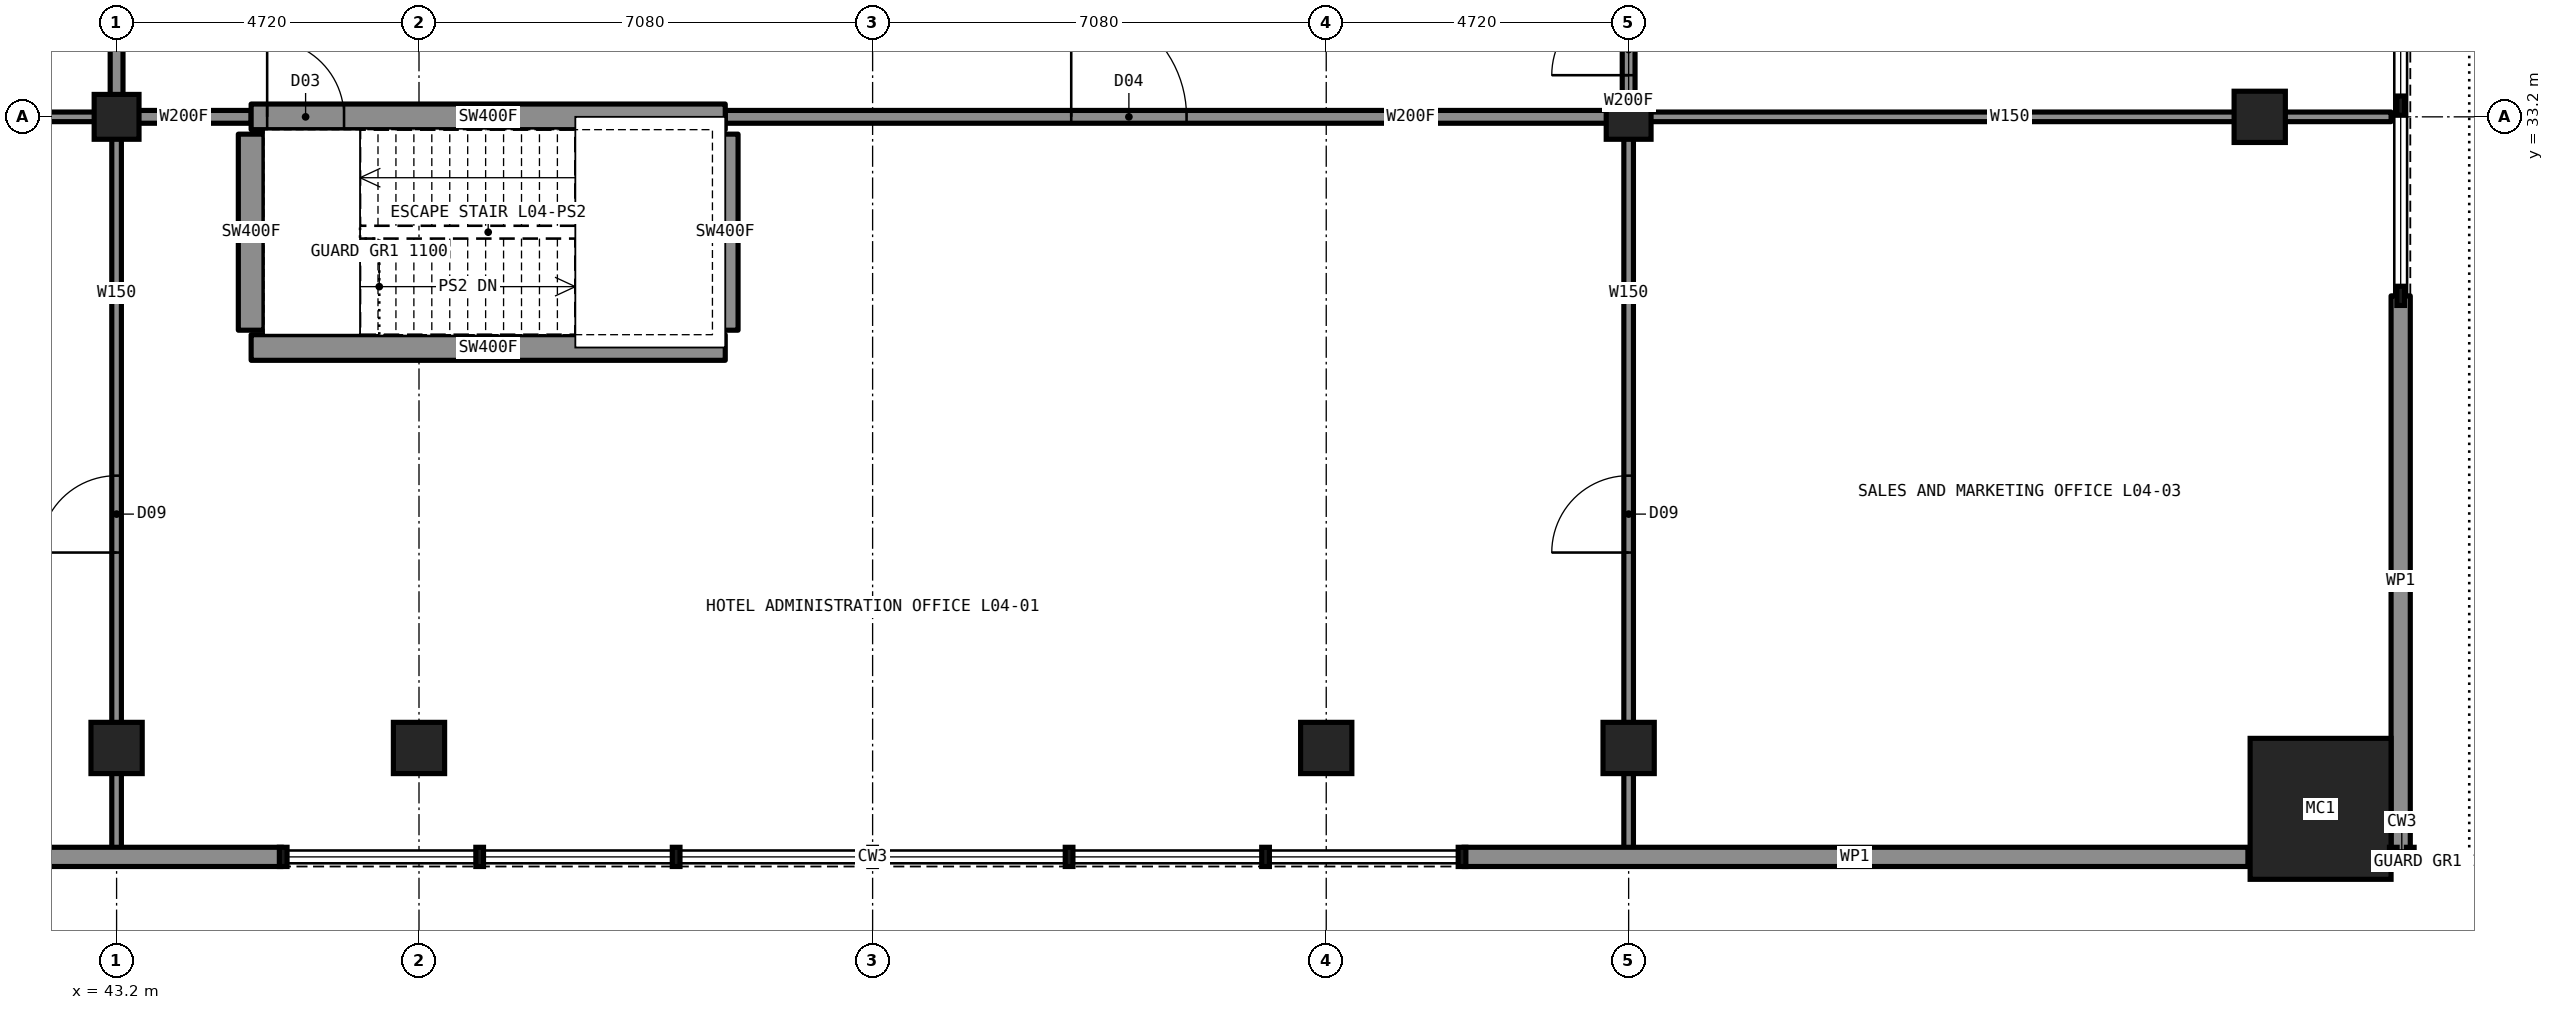
"""IFC4 building model, lengths in metres.
Left out: names, types, materials, properties, quantities, classifications, styles, units other than length and angle.
Written with IfcOpenShell. Run it as: python <this file> out.ifc"""

import sys

from ifc_helpers import new_model, si_unit, direction, frame, frame_2d, origin, origin_2d, place, context, subcontext, project, spatial, rectangle, hollow_rectangle, extrude, element, fill, save


model = new_model("IFC4")
c1 = context("Model", 3, precision=1e-05, world=origin(), true_north=direction((0.0, 1.0)))
c2 = subcontext(c1, "Body", "Model", "MODEL_VIEW")
j1 = project(units=[si_unit("LENGTHUNIT", "METRE"), si_unit("PLANEANGLEUNIT", "RADIAN")], contexts=[c1])
p1 = place(None, origin())
s1 = spatial("IfcSite", under=j1, at=p1, CompositionType="ELEMENT")
p2 = place(p1, origin())
s2 = spatial("IfcBuilding", under=s1, at=p2, CompositionType="ELEMENT")
p3 = place(p2, frame((0.0, 0.0, 20.5)))
s3 = spatial("IfcBuildingStorey", under=s2, at=p3, CompositionType="ELEMENT", Elevation=20.5)
for number, where, z_axis, x_axis in (
    (1, (43.2, 23.35, 0.0), (0.0, 0.0, 1.0), (1.0, 0.0, 0.0)),
    (2, (47.92, 23.35, 0.0), (0.0, 0.0, 1.0), (1.0, 0.0, 0.0)),
    (3, (62.08, 23.35, 0.0), (0.0, 0.0, 1.0), (1.0, 0.0, 0.0)),
    (4, (66.8, 23.35, 0.0), (0.0, 0.0, 1.0), (1.0, 0.0, 0.0)),
    (5, (76.65, 33.2, 0.0), (0.0, 0.0, 1.0), (1.0, 0.0, 0.0)),
):
    element("IfcColumn", number, at=place(p3, frame(where, z_axis=z_axis, x_axis=x_axis)), inside=s3, PredefinedType="COLUMN", context=c2, shape_type="SweptSolid", body=[
        extrude(hollow_rectangle(XDim=0.8, YDim=0.8, WallThickness=0.05, at=origin_2d()), origin(), (0.0, 0.0, 1.0), 4.5),
    ])
for number, where, z_axis, x_axis in (
    (6, (43.2, 33.2, 0.0), (0.0, 0.0, 1.0), (1.0, 0.0, 0.0)),
    (7, (66.8, 33.2, 0.0), (0.0, 0.0, 1.0), (1.0, 0.0, 0.0)),
):
    element("IfcColumn", number, at=place(p3, frame(where, z_axis=z_axis, x_axis=x_axis)), inside=s3, PredefinedType="COLUMN", context=c2, shape_type="SweptSolid", body=[
        extrude(hollow_rectangle(XDim=0.7, YDim=0.7, WallThickness=0.06, at=origin_2d()), origin(), (0.0, 0.0, 1.0), 4.5),
    ])
p4 = place(p3, frame((77.6, 22.4, 0.0), z_axis=(0.0, 0.0, 1.0), x_axis=(1.0, 0.0, 0.0)))
e8 = element("IfcColumn", 8, at=p4, inside=s3, PredefinedType="COLUMN", context=c2, shape_type="SweptSolid", body=[
    extrude(hollow_rectangle(XDim=2.2, YDim=2.2, WallThickness=0.15, at=origin_2d()), origin(), (0.0, 0.0, 1.0), 4.5),
])
p5 = place(p3, frame((43.2, 33.2, 0.0), z_axis=(0.0, 0.0, 1.0), x_axis=(1.0, 0.0, 0.0)))
e9 = element("IfcWall", 9, at=p5, inside=s3, PredefinedType="PARTITIONING", context=c2, shape_type="SweptSolid", body=[
    extrude(rectangle(XDim=2.1, YDim=0.2, at=frame_2d((1.05, 0.0))), origin(), (0.0, 0.0, 1.0), 4.33),
])
p6 = place(p3, frame((52.7, 33.2, 0.0), z_axis=(0.0, 0.0, 1.0), x_axis=(1.0, 0.0, 0.0)))
e10 = element("IfcWall", 10, at=p6, inside=s3, PredefinedType="PARTITIONING", context=c2, shape_type="SweptSolid", body=[
    extrude(rectangle(XDim=14.1, YDim=0.2, at=frame_2d((7.05, 0.0))), origin(), (0.0, 0.0, 1.0), 4.33),
])
p7 = place(p6, frame((5.4, 0.0, 0.0)))
e11 = element("IfcOpeningElement", 11, at=p7, cuts=e10, PredefinedType="OPENING", context=c2, shape_type="SweptSolid", body=[
    extrude(rectangle(XDim=1.8, YDim=2.2, at=frame_2d((0.9, 1.1))), frame((0.0, 0.11, 0.0), z_axis=(0.0, -1.0, 0.0), x_axis=(1.0, 0.0, 0.0)), (0.0, 0.0, 1.0), 0.22),
])
p8 = place(p3, frame((31.255, 33.2, 0.0), z_axis=(0.0, 0.0, 1.0), x_axis=(1.0, 0.0, 0.0)))
e12 = element("IfcWall", 12, at=p8, inside=s3, PredefinedType="PARTITIONING", context=c2, shape_type="SweptSolid", body=[
    extrude(rectangle(XDim=11.945, YDim=0.15, at=frame_2d((5.973, 0.0))), origin(), (0.0, 0.0, 1.0), 3.13),
])
p9 = place(p8, frame((0.295, 0.0, 0.0)))
e13 = element("IfcOpeningElement", 13, at=p9, cuts=e12, PredefinedType="OPENING", context=c2, shape_type="SweptSolid", body=[
    extrude(rectangle(XDim=1.2, YDim=2.2, at=frame_2d((0.6, 1.1))), frame((0.0, 0.085, 0.0), z_axis=(0.0, -1.0, 0.0), x_axis=(1.0, 0.0, 0.0)), (0.0, 0.0, 1.0), 0.17),
])
p10 = place(p3, frame((66.8, 33.2, 0.0), z_axis=(0.0, 0.0, 1.0), x_axis=(1.0, 0.0, 0.0)))
e14 = element("IfcWall", 14, at=p10, inside=s3, PredefinedType="PARTITIONING", context=c2, shape_type="SweptSolid", body=[
    extrude(rectangle(XDim=11.9, YDim=0.15, at=frame_2d((5.95, 0.0))), origin(), (0.0, 0.0, 1.0), 3.13),
])
p11 = place(p3, frame((45.3, 33.2, 0.0), z_axis=(0.0, 0.0, 1.0), x_axis=(1.0, 0.0, 0.0)))
e15 = element("IfcWall", 15, at=p11, inside=s3, PredefinedType="SHEAR", context=c2, shape_type="SweptSolid", body=[
    extrude(rectangle(XDim=7.4, YDim=0.4, at=frame_2d((3.7, 0.0))), origin(), (0.0, 0.0, 1.0), 4.5),
])
p12 = place(p11, frame((0.25, 0.0, 0.0)))
e16 = element("IfcOpeningElement", 16, at=p12, cuts=e15, PredefinedType="OPENING", context=c2, shape_type="SweptSolid", body=[
    extrude(rectangle(XDim=1.2, YDim=2.2, at=frame_2d((0.6, 1.1))), frame((0.0, 0.21, 0.0), z_axis=(0.0, -1.0, 0.0), x_axis=(1.0, 0.0, 0.0)), (0.0, 0.0, 1.0), 0.42),
])
p13 = place(p3, frame((45.3, 29.6, 0.0), z_axis=(0.0, 0.0, 1.0), x_axis=(1.0, 0.0, 0.0)))
e17 = element("IfcWall", 17, at=p13, inside=s3, PredefinedType="SHEAR", context=c2, shape_type="SweptSolid", body=[
    extrude(rectangle(XDim=7.4, YDim=0.4, at=frame_2d((3.7, 0.0))), origin(), (0.0, 0.0, 1.0), 4.5),
])
p14 = place(p3, frame((43.2, 33.2, 0.0), z_axis=(0.0, 0.0, 1.0), x_axis=(0.0, 1.0, 0.0)))
e18 = element("IfcWall", 18, at=p14, inside=s3, PredefinedType="PARTITIONING", context=c2, shape_type="SweptSolid", body=[
    extrude(rectangle(XDim=14.1, YDim=0.2, at=frame_2d((7.05, 0.0))), origin(), (0.0, 0.0, 1.0), 4.33),
])
p15 = place(p14, frame((12.4, 0.0, 0.0)))
e19 = element("IfcOpeningElement", 19, at=p15, cuts=e18, PredefinedType="OPENING", context=c2, shape_type="SweptSolid", body=[
    extrude(rectangle(XDim=1.0, YDim=2.1, at=frame_2d((0.5, 1.05))), frame((0.0, 0.11, 0.0), z_axis=(0.0, -1.0, 0.0), x_axis=(1.0, 0.0, 0.0)), (0.0, 0.0, 1.0), 0.22),
])
p16 = place(p14, frame((2.45, 0.0, 0.0)))
e20 = element("IfcOpeningElement", 20, at=p16, cuts=e18, PredefinedType="OPENING", context=c2, shape_type="SweptSolid", body=[
    extrude(rectangle(XDim=0.9, YDim=2.1, at=frame_2d((0.45, 1.05))), frame((0.0, 0.11, 0.0), z_axis=(0.0, -1.0, 0.0), x_axis=(1.0, 0.0, 0.0)), (0.0, 0.0, 1.0), 0.22),
])
p17 = place(p14, frame((8.25, 0.0, 0.0)))
e21 = element("IfcOpeningElement", 21, at=p17, cuts=e18, PredefinedType="OPENING", context=c2, shape_type="SweptSolid", body=[
    extrude(rectangle(XDim=0.9, YDim=2.1, at=frame_2d((0.45, 1.05))), frame((0.0, 0.11, 0.0), z_axis=(0.0, -1.0, 0.0), x_axis=(1.0, 0.0, 0.0)), (0.0, 0.0, 1.0), 0.22),
])
p18 = place(p3, frame((43.2, 21.755, 0.0), z_axis=(0.0, 0.0, 1.0), x_axis=(0.0, 1.0, 0.0)))
e22 = element("IfcWall", 22, at=p18, inside=s3, PredefinedType="PARTITIONING", context=c2, shape_type="SweptSolid", body=[
    extrude(rectangle(XDim=11.445, YDim=0.15, at=frame_2d((5.723, 0.0))), origin(), (0.0, 0.0, 1.0), 3.13),
])
p19 = place(p18, frame((4.645, 0.0, 0.0)))
e23 = element("IfcOpeningElement", 23, at=p19, cuts=e22, PredefinedType="OPENING", context=c2, shape_type="SweptSolid", body=[
    extrude(rectangle(XDim=1.2, YDim=2.2, at=frame_2d((0.6, 1.1))), frame((0.0, 0.085, 0.0), z_axis=(0.0, -1.0, 0.0), x_axis=(1.0, 0.0, 0.0)), (0.0, 0.0, 1.0), 0.17),
])
for number, where, z_axis, x_axis in (
    (24, (52.7, 29.87, 0.0), (0.0, 0.0, 1.0), (0.0, 1.0, 0.0)),
    (25, (45.3, 29.87, 0.0), (0.0, 0.0, 1.0), (0.0, 1.0, 0.0)),
):
    element("IfcWall", number, at=place(p3, frame(where, z_axis=z_axis, x_axis=x_axis)), inside=s3, PredefinedType="SHEAR", context=c2, shape_type="SweptSolid", body=[
        extrude(rectangle(XDim=3.06, YDim=0.4, at=frame_2d((1.53, 0.0))), origin(), (0.0, 0.0, 1.0), 4.5),
    ])
p20 = place(p3, frame((66.8, 33.2, 0.0), z_axis=(0.0, 0.0, 1.0), x_axis=(0.0, 1.0, 0.0)))
e26 = element("IfcWall", 26, at=p20, inside=s3, PredefinedType="PARTITIONING", context=c2, shape_type="SweptSolid", body=[
    extrude(rectangle(XDim=2.1, YDim=0.2, at=frame_2d((1.05, 0.0))), origin(), (0.0, 0.0, 1.0), 4.33),
])
p21 = place(p20, frame((0.65, 0.0, 0.0)))
e27 = element("IfcOpeningElement", 27, at=p21, cuts=e26, PredefinedType="OPENING", context=c2, shape_type="SweptSolid", body=[
    extrude(rectangle(XDim=1.2, YDim=2.2, at=frame_2d((0.6, 1.1))), frame((0.0, 0.11, 0.0), z_axis=(0.0, -1.0, 0.0), x_axis=(1.0, 0.0, 0.0)), (0.0, 0.0, 1.0), 0.22),
])
p22 = place(p3, frame((66.8, 21.755, 0.0), z_axis=(0.0, 0.0, 1.0), x_axis=(0.0, 1.0, 0.0)))
e28 = element("IfcWall", 28, at=p22, inside=s3, PredefinedType="PARTITIONING", context=c2, shape_type="SweptSolid", body=[
    extrude(rectangle(XDim=11.445, YDim=0.15, at=frame_2d((5.723, 0.0))), origin(), (0.0, 0.0, 1.0), 3.13),
])
p23 = place(p22, frame((4.645, 0.0, 0.0)))
e29 = element("IfcOpeningElement", 29, at=p23, cuts=e28, PredefinedType="OPENING", context=c2, shape_type="SweptSolid", body=[
    extrude(rectangle(XDim=1.2, YDim=2.2, at=frame_2d((0.6, 1.1))), frame((0.0, 0.085, 0.0), z_axis=(0.0, -1.0, 0.0), x_axis=(1.0, 0.0, 0.0)), (0.0, 0.0, 1.0), 0.17),
])
p24 = place(p3, frame((78.85, 21.5, 0.0), z_axis=(0.0, 0.0, 1.0), x_axis=(0.0, 1.0, 0.0)))
e30 = element("IfcWall", 30, at=p24, inside=s3, PredefinedType="SOLIDWALL", context=c2, shape_type="SweptSolid", body=[
    extrude(rectangle(XDim=8.906, YDim=0.3, at=frame_2d((4.453, 0.0))), origin(), (0.0, 0.0, 1.0), 4.33),
])
for number, where, z_axis, x_axis in (
    (31, (33.534, 21.65, 0.0), (0.0, 0.0, 1.0), (1.0, 0.0, 0.0)),
    (32, (64.199, 21.65, 0.0), (0.0, 0.0, 1.0), (1.0, 0.0, 0.0)),
):
    element("IfcWall", number, at=place(p3, frame(where, z_axis=z_axis, x_axis=x_axis)), inside=s3, PredefinedType="SOLIDWALL", context=c2, shape_type="SweptSolid", body=[
        extrude(rectangle(XDim=12.266, YDim=0.3, at=frame_2d((6.133, 0.0))), origin(), (0.0, 0.0, 1.0), 4.33),
    ])
p25 = place(p12, origin())
e33 = element("IfcDoor", 33, at=p25, inside=s3, OperationType="SINGLE_SWING_LEFT", PredefinedType="DOOR", context=c2, shape_type="SweptSolid", body=[
    extrude(rectangle(XDim=1.2, YDim=2.2, at=frame_2d((0.6, 1.1))), frame((0.0, 0.025, 0.0), z_axis=(0.0, -1.0, 0.0), x_axis=(1.0, 0.0, 0.0)), (0.0, 0.0, 1.0), 0.05),
])
fill(e16, e33)
p26 = place(p7, origin())
e34 = element("IfcDoor", 34, at=p26, inside=s3, OperationType="DOUBLE_DOOR_SINGLE_SWING", PredefinedType="DOOR", context=c2, shape_type="SweptSolid", body=[
    extrude(rectangle(XDim=1.8, YDim=2.2, at=frame_2d((0.9, 1.1))), frame((0.0, 0.025, 0.0), z_axis=(0.0, -1.0, 0.0), x_axis=(1.0, 0.0, 0.0)), (0.0, 0.0, 1.0), 0.05),
])
fill(e11, e34)
p27 = place(p19, origin())
e35 = element("IfcDoor", 35, at=p27, inside=s3, OperationType="SINGLE_SWING_LEFT", PredefinedType="DOOR", context=c2, shape_type="SweptSolid", body=[
    extrude(rectangle(XDim=1.2, YDim=2.2, at=frame_2d((0.6, 1.1))), frame((0.0, 0.025, 0.0), z_axis=(0.0, -1.0, 0.0), x_axis=(1.0, 0.0, 0.0)), (0.0, 0.0, 1.0), 0.05),
])
fill(e23, e35)
p28 = place(p23, origin())
e36 = element("IfcDoor", 36, at=p28, inside=s3, OperationType="SINGLE_SWING_LEFT", PredefinedType="DOOR", context=c2, shape_type="SweptSolid", body=[
    extrude(rectangle(XDim=1.2, YDim=2.2, at=frame_2d((0.6, 1.1))), frame((0.0, 0.025, 0.0), z_axis=(0.0, -1.0, 0.0), x_axis=(1.0, 0.0, 0.0)), (0.0, 0.0, 1.0), 0.05),
])
fill(e29, e36)
p29 = place(p21, origin())
e37 = element("IfcDoor", 37, at=p29, inside=s3, OperationType="SINGLE_SWING_LEFT", PredefinedType="DOOR", context=c2, shape_type="SweptSolid", body=[
    extrude(rectangle(XDim=1.2, YDim=2.2, at=frame_2d((0.6, 1.1))), frame((0.0, 0.025, 0.0), z_axis=(0.0, -1.0, 0.0), x_axis=(1.0, 0.0, 0.0)), (0.0, 0.0, 1.0), 0.05),
])
fill(e27, e37)
save(model, sys.argv[1])
